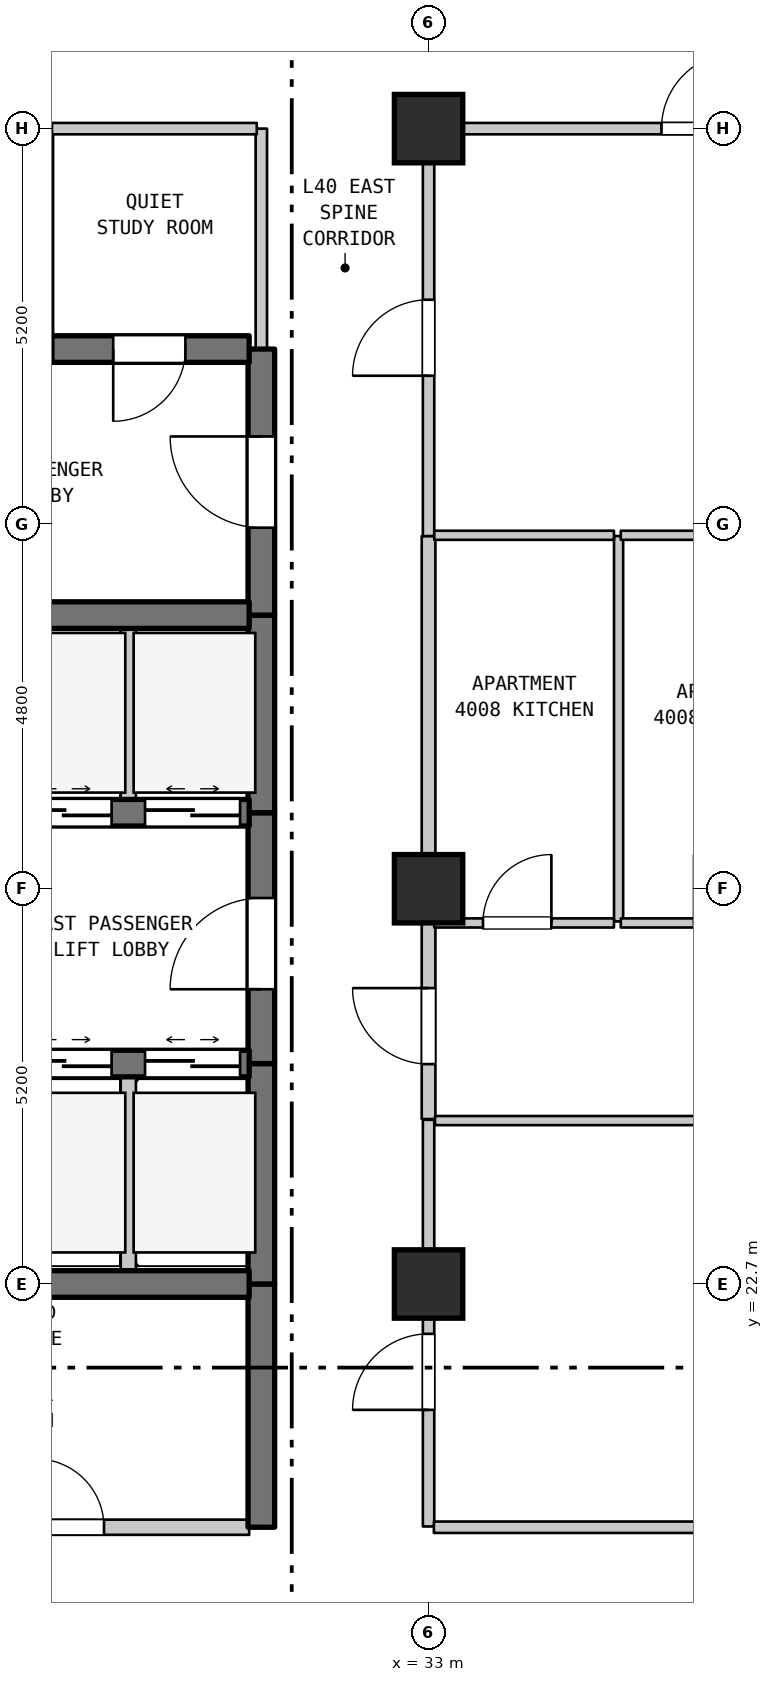
"""IFC4 building model, lengths in metres.
Left out: names, types, materials, properties, quantities, classifications, styles, units other than length and angle.
Written with IfcOpenShell. Run it as: python <this file> out.ifc"""

import sys

from ifc_helpers import new_model, si_unit, direction, frame, frame_2d, origin, origin_2d, place, context, subcontext, project, spatial, rectangle, extrude, element, fill, save


model = new_model("IFC4")
c1 = context("Model", 3, precision=1e-05, world=origin(), true_north=direction((0.0, 1.0)))
c2 = subcontext(c1, "Body", "Model", "MODEL_VIEW")
j1 = project(units=[si_unit("LENGTHUNIT", "METRE"), si_unit("PLANEANGLEUNIT", "RADIAN")], contexts=[c1])
p1 = place(None, origin())
s1 = spatial("IfcSite", under=j1, at=p1, CompositionType="ELEMENT")
p2 = place(p1, origin())
s2 = spatial("IfcBuilding", under=s1, at=p2, CompositionType="ELEMENT")
p3 = place(p2, frame((0.0, 0.0, 164.6)))
s3 = spatial("IfcBuildingStorey", under=s2, at=p3, CompositionType="ELEMENT", Elevation=164.6)
for number, where, z_axis, x_axis in (
    (1, (33.0, 22.7, 0.0), (0.0, 0.0, 1.0), (1.0, 0.0, 0.0)),
    (2, (33.0, 27.9, 0.0), (0.0, 0.0, 1.0), (1.0, 0.0, 0.0)),
    (3, (33.0, 37.9, 0.0), (0.0, 0.0, 1.0), (1.0, 0.0, 0.0)),
):
    element("IfcColumn", number, at=place(p3, frame(where, z_axis=z_axis, x_axis=x_axis)), inside=s3, PredefinedType="COLUMN", context=c2, shape_type="SweptSolid", body=[
        extrude(rectangle(XDim=0.9, YDim=0.9, at=origin_2d()), origin(), (0.0, 0.0, 1.0), 4.5),
    ])
p4 = place(p3, frame((28.0, 35.0, 0.0), z_axis=(0.0, 0.0, 1.0), x_axis=(0.0, 1.0, 0.0)))
e4 = element("IfcWall", 4, at=p4, inside=s3, PredefinedType="PARTITIONING", context=c2, shape_type="SweptSolid", body=[
    extrude(rectangle(XDim=2.9, YDim=0.12, at=frame_2d((1.45, 0.0))), origin(), (0.0, 0.0, 1.0), 4.19),
])
p5 = place(p3, frame((29.05, 22.7, 0.0), z_axis=(0.0, 0.0, 1.0), x_axis=(0.0, 1.0, 0.0)))
e5 = element("IfcWall", 5, at=p5, inside=s3, PredefinedType="STANDARD", context=c2, shape_type="SweptSolid", body=[
    extrude(rectangle(XDim=2.9, YDim=0.2, at=frame_2d((1.45, 0.0))), origin(), (0.0, 0.0, 1.0), 4.19),
])
p6 = place(p3, frame((29.05, 28.9, 0.0), z_axis=(0.0, 0.0, 1.0), x_axis=(0.0, 1.0, 0.0)))
e6 = element("IfcWall", 6, at=p6, inside=s3, PredefinedType="STANDARD", context=c2, shape_type="SweptSolid", body=[
    extrude(rectangle(XDim=2.6, YDim=0.2, at=frame_2d((1.3, 0.0))), origin(), (0.0, 0.0, 1.0), 4.19),
])
p7 = place(p3, frame((30.8, 19.5, 0.0), z_axis=(0.0, 0.0, 1.0), x_axis=(0.0, 1.0, 0.0)))
e7 = element("IfcWall", 7, at=p7, inside=s3, PredefinedType="SHEAR", context=c2, shape_type="SweptSolid", body=[
    extrude(rectangle(XDim=3.2, YDim=0.35, at=frame_2d((1.6, 0.0))), origin(), (0.0, 0.0, 1.0), 4.19),
])
p8 = place(p3, frame((30.8, 22.7, 0.0), z_axis=(0.0, 0.0, 1.0), x_axis=(0.0, 1.0, 0.0)))
e8 = element("IfcWall", 8, at=p8, inside=s3, PredefinedType="SHEAR", context=c2, shape_type="SweptSolid", body=[
    extrude(rectangle(XDim=2.9, YDim=0.35, at=frame_2d((1.45, 0.0))), origin(), (0.0, 0.0, 1.0), 4.19),
])
p9 = place(p3, frame((30.8, 25.6, 0.0), z_axis=(0.0, 0.0, 1.0), x_axis=(0.0, 1.0, 0.0)))
e9 = element("IfcWall", 9, at=p9, inside=s3, PredefinedType="SHEAR", context=c2, shape_type="SweptSolid", body=[
    extrude(rectangle(XDim=3.3, YDim=0.35, at=frame_2d((1.65, 0.0))), origin(), (0.0, 0.0, 1.0), 4.19),
])
p10 = place(p9, frame((0.978, 0.0, 0.0)))
e10 = element("IfcOpeningElement", 10, at=p10, cuts=e9, PredefinedType="OPENING", context=c2, shape_type="SweptSolid", body=[
    extrude(rectangle(XDim=1.2, YDim=2.2, at=frame_2d((0.6, 1.1))), frame((0.0, 0.185, 0.0), z_axis=(0.0, -1.0, 0.0), x_axis=(1.0, 0.0, 0.0)), (0.0, 0.0, 1.0), 0.37),
])
p11 = place(p3, frame((30.8, 28.9, 0.0), z_axis=(0.0, 0.0, 1.0), x_axis=(0.0, 1.0, 0.0)))
e11 = element("IfcWall", 11, at=p11, inside=s3, PredefinedType="SHEAR", context=c2, shape_type="SweptSolid", body=[
    extrude(rectangle(XDim=2.6, YDim=0.35, at=frame_2d((1.3, 0.0))), origin(), (0.0, 0.0, 1.0), 4.19),
])
p12 = place(p3, frame((30.8, 31.5, 0.0), z_axis=(0.0, 0.0, 1.0), x_axis=(0.0, 1.0, 0.0)))
e12 = element("IfcWall", 12, at=p12, inside=s3, PredefinedType="SHEAR", context=c2, shape_type="SweptSolid", body=[
    extrude(rectangle(XDim=3.5, YDim=0.35, at=frame_2d((1.75, 0.0))), origin(), (0.0, 0.0, 1.0), 4.19),
])
p13 = place(p12, frame((1.15, 0.0, 0.0)))
e13 = element("IfcOpeningElement", 13, at=p13, cuts=e12, PredefinedType="OPENING", context=c2, shape_type="SweptSolid", body=[
    extrude(rectangle(XDim=1.2, YDim=2.2, at=frame_2d((0.6, 1.1))), frame((0.0, 0.185, 0.0), z_axis=(0.0, -1.0, 0.0), x_axis=(1.0, 0.0, 0.0)), (0.0, 0.0, 1.0), 0.37),
])
p14 = place(p3, frame((30.8, 35.0, 0.0), z_axis=(0.0, 0.0, 1.0), x_axis=(0.0, 1.0, 0.0)))
e14 = element("IfcWall", 14, at=p14, inside=s3, PredefinedType="STANDARD", context=c2, shape_type="SweptSolid", body=[
    extrude(rectangle(XDim=2.9, YDim=0.15, at=frame_2d((1.45, 0.0))), origin(), (0.0, 0.0, 1.0), 4.19),
])
p15 = place(p3, frame((33.0, 19.51, 0.0), z_axis=(0.0, 0.0, 1.0), x_axis=(0.0, 1.0, 0.0)))
e15 = element("IfcWall", 15, at=p15, inside=s3, PredefinedType="STANDARD", context=c2, shape_type="SweptSolid", body=[
    extrude(rectangle(XDim=5.35, YDim=0.15, at=frame_2d((2.675, 0.0))), origin(), (0.0, 0.0, 1.0), 3.79),
])
p16 = place(p15, frame((1.534, 0.0, 0.0)))
e16 = element("IfcOpeningElement", 16, at=p16, cuts=e15, PredefinedType="OPENING", context=c2, shape_type="SweptSolid", body=[
    extrude(rectangle(XDim=1.0, YDim=2.15, at=frame_2d((0.5, 1.075))), frame((0.0, 0.085, 0.0), z_axis=(0.0, -1.0, 0.0), x_axis=(1.0, 0.0, 0.0)), (0.0, 0.0, 1.0), 0.17),
])
p17 = place(p3, frame((33.0, 24.87, 0.0), z_axis=(0.0, 0.0, 1.0), x_axis=(0.0, 1.0, 0.0)))
e17 = element("IfcWall", 17, at=p17, inside=s3, PredefinedType="STANDARD", context=c2, shape_type="SweptSolid", body=[
    extrude(rectangle(XDim=2.6, YDim=0.18, at=frame_2d((1.3, 0.0))), origin(), (0.0, 0.0, 1.0), 3.79),
])
p18 = place(p17, frame((0.723, 0.0, 0.0)))
e18 = element("IfcOpeningElement", 18, at=p18, cuts=e17, PredefinedType="OPENING", context=c2, shape_type="SweptSolid", body=[
    extrude(rectangle(XDim=1.0, YDim=2.15, at=frame_2d((0.5, 1.075))), frame((0.0, 0.1, 0.0), z_axis=(0.0, -1.0, 0.0), x_axis=(1.0, 0.0, 0.0)), (0.0, 0.0, 1.0), 0.2),
])
p19 = place(p3, frame((33.0, 27.47, 0.0), z_axis=(0.0, 0.0, 1.0), x_axis=(0.0, 1.0, 0.0)))
e19 = element("IfcWall", 19, at=p19, inside=s3, PredefinedType="STANDARD", context=c2, shape_type="SweptSolid", body=[
    extrude(rectangle(XDim=5.07, YDim=0.18, at=frame_2d((2.535, 0.0))), origin(), (0.0, 0.0, 1.0), 3.69),
])
p20 = place(p3, frame((33.0, 32.54, 0.0), z_axis=(0.0, 0.0, 1.0), x_axis=(0.0, 1.0, 0.0)))
e20 = element("IfcWall", 20, at=p20, inside=s3, PredefinedType="STANDARD", context=c2, shape_type="SweptSolid", body=[
    extrude(rectangle(XDim=5.36, YDim=0.15, at=frame_2d((2.68, 0.0))), origin(), (0.0, 0.0, 1.0), 3.69),
])
p21 = place(p20, frame((2.109, 0.0, 0.0)))
e21 = element("IfcOpeningElement", 21, at=p21, cuts=e20, PredefinedType="OPENING", context=c2, shape_type="SweptSolid", body=[
    extrude(rectangle(XDim=1.0, YDim=2.15, at=frame_2d((0.5, 1.075))), frame((0.0, 0.085, 0.0), z_axis=(0.0, -1.0, 0.0), x_axis=(1.0, 0.0, 0.0)), (0.0, 0.0, 1.0), 0.17),
])
p22 = place(p3, frame((35.5, 27.47, 0.0), z_axis=(0.0, 0.0, 1.0), x_axis=(0.0, 1.0, 0.0)))
e22 = element("IfcWall", 22, at=p22, inside=s3, PredefinedType="PARTITIONING", context=c2, shape_type="SweptSolid", body=[
    extrude(rectangle(XDim=5.07, YDim=0.12, at=frame_2d((2.535, 0.0))), origin(), (0.0, 0.0, 1.0), 4.19),
])
p23 = place(p3, frame((25.985, 19.5, 0.0), z_axis=(0.0, 0.0, 1.0), x_axis=(1.0, 0.0, 0.0)))
e23 = element("IfcWall", 23, at=p23, inside=s3, PredefinedType="STANDARD", context=c2, shape_type="SweptSolid", body=[
    extrude(rectangle(XDim=4.655, YDim=0.2, at=frame_2d((2.327, 0.0))), origin(), (0.0, 0.0, 1.0), 4.19),
])
p24 = place(p23, frame((1.845, 0.0, 0.0)))
e24 = element("IfcOpeningElement", 24, at=p24, cuts=e23, PredefinedType="OPENING", context=c2, shape_type="SweptSolid", body=[
    extrude(rectangle(XDim=0.9, YDim=2.15, at=frame_2d((0.45, 1.075))), frame((0.0, 0.11, 0.0), z_axis=(0.0, -1.0, 0.0), x_axis=(1.0, 0.0, 0.0)), (0.0, 0.0, 1.0), 0.22),
])
p25 = place(p3, frame((33.07, 19.5, 0.0), z_axis=(0.0, 0.0, 1.0), x_axis=(1.0, 0.0, 0.0)))
e25 = element("IfcWall", 25, at=p25, inside=s3, PredefinedType="STANDARD", context=c2, shape_type="SweptSolid", body=[
    extrude(rectangle(XDim=21.51, YDim=0.15, at=frame_2d((10.755, 0.0))), origin(), (0.0, 0.0, 1.0), 4.19),
])
p26 = place(p25, frame((10.185, 0.0, 0.0)))
e26 = element("IfcOpeningElement", 26, at=p26, cuts=e25, PredefinedType="OPENING", context=c2, shape_type="SweptSolid", body=[
    extrude(rectangle(XDim=1.0, YDim=2.15, at=frame_2d((0.5, 1.075))), frame((0.0, 0.085, 0.0), z_axis=(0.0, -1.0, 0.0), x_axis=(1.0, 0.0, 0.0)), (0.0, 0.0, 1.0), 0.17),
])
p27 = place(p3, frame((27.46, 22.7, 0.0), z_axis=(0.0, 0.0, 1.0), x_axis=(1.0, 0.0, 0.0)))
e27 = element("IfcWall", 27, at=p27, inside=s3, PredefinedType="SHEAR", context=c2, shape_type="SweptSolid", body=[
    extrude(rectangle(XDim=3.18, YDim=0.35, at=frame_2d((1.59, 0.0))), origin(), (0.0, 0.0, 1.0), 4.19),
])
p28 = place(p3, frame((33.085, 24.85, 0.0), z_axis=(0.0, 0.0, 1.0), x_axis=(1.0, 0.0, 0.0)))
e28 = element("IfcWall", 28, at=p28, inside=s3, PredefinedType="PARTITIONING", context=c2, shape_type="SweptSolid", body=[
    extrude(rectangle(XDim=23.905, YDim=0.12, at=frame_2d((11.953, 0.0))), origin(), (0.0, 0.0, 1.0), 4.19),
])
p29 = place(p3, frame((27.46, 25.6, 0.0), z_axis=(0.0, 0.0, 1.0), x_axis=(1.0, 0.0, 0.0)))
e29 = element("IfcWall", 29, at=p29, inside=s3, PredefinedType="SHEAR", context=c2, shape_type="SweptSolid", body=[
    extrude(rectangle(XDim=3.18, YDim=0.35, at=frame_2d((1.59, 0.0))), origin(), (0.0, 0.0, 1.0), 4.19),
])
p30 = place(p29, frame((0.12, 0.0, 0.0)))
e30 = element("IfcOpeningElement", 30, at=p30, cuts=e29, PredefinedType="OPENING", context=c2, shape_type="SweptSolid", body=[
    extrude(rectangle(XDim=1.25, YDim=2.2, at=frame_2d((0.625, 1.1))), frame((0.0, 0.185, 0.0), z_axis=(0.0, -1.0, 0.0), x_axis=(1.0, 0.0, 0.0)), (0.0, 0.0, 1.0), 0.37),
])
p31 = place(p29, frame((1.81, 0.0, 0.0)))
e31 = element("IfcOpeningElement", 31, at=p31, cuts=e29, PredefinedType="OPENING", context=c2, shape_type="SweptSolid", body=[
    extrude(rectangle(XDim=1.25, YDim=2.2, at=frame_2d((0.625, 1.1))), frame((0.0, 0.185, 0.0), z_axis=(0.0, -1.0, 0.0), x_axis=(1.0, 0.0, 0.0)), (0.0, 0.0, 1.0), 0.37),
])
p32 = place(p3, frame((33.075, 27.45, 0.0), z_axis=(0.0, 0.0, 1.0), x_axis=(1.0, 0.0, 0.0)))
e32 = element("IfcWall", 32, at=p32, inside=s3, PredefinedType="PARTITIONING", context=c2, shape_type="SweptSolid", body=[
    extrude(rectangle(XDim=2.364, YDim=0.12, at=frame_2d((1.182, 0.0))), origin(), (0.0, 0.0, 1.0), 4.19),
])
p33 = place(p32, frame((0.641, 0.0, 0.0)))
e33 = element("IfcOpeningElement", 33, at=p33, cuts=e32, PredefinedType="OPENING", context=c2, shape_type="SweptSolid", body=[
    extrude(rectangle(XDim=0.9, YDim=2.15, at=frame_2d((0.45, 1.075))), frame((0.0, 0.07, 0.0), z_axis=(0.0, -1.0, 0.0), x_axis=(1.0, 0.0, 0.0)), (0.0, 0.0, 1.0), 0.14),
])
p34 = place(p3, frame((35.529, 27.45, 0.0), z_axis=(0.0, 0.0, 1.0), x_axis=(1.0, 0.0, 0.0)))
e34 = element("IfcWall", 34, at=p34, inside=s3, PredefinedType="PARTITIONING", context=c2, shape_type="SweptSolid", body=[
    extrude(rectangle(XDim=2.826, YDim=0.12, at=frame_2d((1.413, 0.0))), origin(), (0.0, 0.0, 1.0), 4.19),
])
p35 = place(p34, frame((0.963, 0.0, 0.0)))
e35 = element("IfcOpeningElement", 35, at=p35, cuts=e34, PredefinedType="OPENING", context=c2, shape_type="SweptSolid", body=[
    extrude(rectangle(XDim=0.9, YDim=2.1, at=frame_2d((0.45, 1.05))), frame((0.0, 0.07, 0.0), z_axis=(0.0, -1.0, 0.0), x_axis=(1.0, 0.0, 0.0)), (0.0, 0.0, 1.0), 0.14),
])
p36 = place(p3, frame((27.46, 28.9, 0.0), z_axis=(0.0, 0.0, 1.0), x_axis=(1.0, 0.0, 0.0)))
e36 = element("IfcWall", 36, at=p36, inside=s3, PredefinedType="SHEAR", context=c2, shape_type="SweptSolid", body=[
    extrude(rectangle(XDim=3.18, YDim=0.35, at=frame_2d((1.59, 0.0))), origin(), (0.0, 0.0, 1.0), 4.19),
])
p37 = place(p36, frame((0.12, 0.0, 0.0)))
e37 = element("IfcOpeningElement", 37, at=p37, cuts=e36, PredefinedType="OPENING", context=c2, shape_type="SweptSolid", body=[
    extrude(rectangle(XDim=1.25, YDim=2.2, at=frame_2d((0.625, 1.1))), frame((0.0, 0.185, 0.0), z_axis=(0.0, -1.0, 0.0), x_axis=(1.0, 0.0, 0.0)), (0.0, 0.0, 1.0), 0.37),
])
p38 = place(p36, frame((1.81, 0.0, 0.0)))
e38 = element("IfcOpeningElement", 38, at=p38, cuts=e36, PredefinedType="OPENING", context=c2, shape_type="SweptSolid", body=[
    extrude(rectangle(XDim=1.25, YDim=2.2, at=frame_2d((0.625, 1.1))), frame((0.0, 0.185, 0.0), z_axis=(0.0, -1.0, 0.0), x_axis=(1.0, 0.0, 0.0)), (0.0, 0.0, 1.0), 0.37),
])
p39 = place(p3, frame((27.46, 31.5, 0.0), z_axis=(0.0, 0.0, 1.0), x_axis=(1.0, 0.0, 0.0)))
e39 = element("IfcWall", 39, at=p39, inside=s3, PredefinedType="SHEAR", context=c2, shape_type="SweptSolid", body=[
    extrude(rectangle(XDim=3.18, YDim=0.35, at=frame_2d((1.59, 0.0))), origin(), (0.0, 0.0, 1.0), 4.19),
])
p40 = place(p3, frame((33.075, 32.55, 0.0), z_axis=(0.0, 0.0, 1.0), x_axis=(1.0, 0.0, 0.0)))
e40 = element("IfcWall", 40, at=p40, inside=s3, PredefinedType="PARTITIONING", context=c2, shape_type="SweptSolid", body=[
    extrude(rectangle(XDim=2.364, YDim=0.12, at=frame_2d((1.182, 0.0))), origin(), (0.0, 0.0, 1.0), 4.19),
])
p41 = place(p3, frame((35.529, 32.55, 0.0), z_axis=(0.0, 0.0, 1.0), x_axis=(1.0, 0.0, 0.0)))
e41 = element("IfcWall", 41, at=p41, inside=s3, PredefinedType="PARTITIONING", context=c2, shape_type="SweptSolid", body=[
    extrude(rectangle(XDim=2.826, YDim=0.12, at=frame_2d((1.413, 0.0))), origin(), (0.0, 0.0, 1.0), 4.19),
])
p42 = place(p3, frame((28.045, 35.0, 0.0), z_axis=(0.0, 0.0, 1.0), x_axis=(1.0, 0.0, 0.0)))
e42 = element("IfcWall", 42, at=p42, inside=s3, PredefinedType="SHEAR", context=c2, shape_type="SweptSolid", body=[
    extrude(rectangle(XDim=2.595, YDim=0.35, at=frame_2d((1.297, 0.0))), origin(), (0.0, 0.0, 1.0), 4.19),
])
p43 = place(p42, frame((0.806, 0.0, 0.0)))
e43 = element("IfcOpeningElement", 43, at=p43, cuts=e42, PredefinedType="OPENING", context=c2, shape_type="SweptSolid", body=[
    extrude(rectangle(XDim=0.95, YDim=2.15, at=frame_2d((0.475, 1.075))), frame((0.0, 0.185, 0.0), z_axis=(0.0, -1.0, 0.0), x_axis=(1.0, 0.0, 0.0)), (0.0, 0.0, 1.0), 0.37),
])
p44 = place(p3, frame((28.045, 37.9, 0.0), z_axis=(0.0, 0.0, 1.0), x_axis=(1.0, 0.0, 0.0)))
e44 = element("IfcWall", 44, at=p44, inside=s3, PredefinedType="STANDARD", context=c2, shape_type="SweptSolid", body=[
    extrude(rectangle(XDim=2.695, YDim=0.15, at=frame_2d((1.348, 0.0))), origin(), (0.0, 0.0, 1.0), 3.69),
])
p45 = place(p3, frame((33.06, 37.9, 0.0), z_axis=(0.0, 0.0, 1.0), x_axis=(1.0, 0.0, 0.0)))
e45 = element("IfcWall", 45, at=p45, inside=s3, PredefinedType="STANDARD", context=c2, shape_type="SweptSolid", body=[
    extrude(rectangle(XDim=7.164, YDim=0.15, at=frame_2d((3.582, 0.0))), origin(), (0.0, 0.0, 1.0), 4.19),
])
p46 = place(p45, frame((3.004, 0.0, 0.0)))
e46 = element("IfcOpeningElement", 46, at=p46, cuts=e45, PredefinedType="OPENING", context=c2, shape_type="SweptSolid", body=[
    extrude(rectangle(XDim=1.0, YDim=2.15, at=frame_2d((0.5, 1.075))), frame((0.0, 0.085, 0.0), z_axis=(0.0, -1.0, 0.0), x_axis=(1.0, 0.0, 0.0)), (0.0, 0.0, 1.0), 0.17),
])
p47 = place(p10, origin())
e47 = element("IfcDoor", 47, at=p47, inside=s3, OperationType="SINGLE_SWING_LEFT", PredefinedType="DOOR", context=c2, shape_type="SweptSolid", body=[
    extrude(rectangle(XDim=1.2, YDim=2.2, at=frame_2d((0.6, 1.1))), frame((0.0, 0.025, 0.0), z_axis=(0.0, -1.0, 0.0), x_axis=(1.0, 0.0, 0.0)), (0.0, 0.0, 1.0), 0.05),
])
fill(e10, e47)
p48 = place(p13, origin())
e48 = element("IfcDoor", 48, at=p48, inside=s3, OperationType="SINGLE_SWING_RIGHT", PredefinedType="DOOR", context=c2, shape_type="SweptSolid", body=[
    extrude(rectangle(XDim=1.2, YDim=2.2, at=frame_2d((0.6, 1.1))), frame((0.0, 0.025, 0.0), z_axis=(0.0, -1.0, 0.0), x_axis=(1.0, 0.0, 0.0)), (0.0, 0.0, 1.0), 0.05),
])
fill(e13, e48)
p49 = place(p16, origin())
e49 = element("IfcDoor", 49, at=p49, inside=s3, OperationType="SINGLE_SWING_LEFT", PredefinedType="DOOR", context=c2, shape_type="SweptSolid", body=[
    extrude(rectangle(XDim=1.0, YDim=2.15, at=frame_2d((0.5, 1.075))), frame((0.0, 0.025, 0.0), z_axis=(0.0, -1.0, 0.0), x_axis=(1.0, 0.0, 0.0)), (0.0, 0.0, 1.0), 0.05),
])
fill(e16, e49)
p50 = place(p18, origin())
e50 = element("IfcDoor", 50, at=p50, inside=s3, OperationType="SINGLE_SWING_RIGHT", PredefinedType="DOOR", context=c2, shape_type="SweptSolid", body=[
    extrude(rectangle(XDim=1.0, YDim=2.15, at=frame_2d((0.5, 1.075))), frame((0.0, 0.025, 0.0), z_axis=(0.0, -1.0, 0.0), x_axis=(1.0, 0.0, 0.0)), (0.0, 0.0, 1.0), 0.05),
])
fill(e18, e50)
p51 = place(p21, origin())
e51 = element("IfcDoor", 51, at=p51, inside=s3, OperationType="SINGLE_SWING_LEFT", PredefinedType="DOOR", context=c2, shape_type="SweptSolid", body=[
    extrude(rectangle(XDim=1.0, YDim=2.15, at=frame_2d((0.5, 1.075))), frame((0.0, 0.025, 0.0), z_axis=(0.0, -1.0, 0.0), x_axis=(1.0, 0.0, 0.0)), (0.0, 0.0, 1.0), 0.05),
])
fill(e21, e51)
p52 = place(p24, origin())
e52 = element("IfcDoor", 52, at=p52, inside=s3, OperationType="SINGLE_SWING_LEFT", PredefinedType="DOOR", context=c2, shape_type="SweptSolid", body=[
    extrude(rectangle(XDim=0.9, YDim=2.15, at=frame_2d((0.45, 1.075))), frame((0.0, 0.025, 0.0), z_axis=(0.0, -1.0, 0.0), x_axis=(1.0, 0.0, 0.0)), (0.0, 0.0, 1.0), 0.05),
])
fill(e24, e52)
p53 = place(p30, origin())
e53 = element("IfcDoor", 53, at=p53, inside=s3, OperationType="DOUBLE_DOOR_SLIDING", PredefinedType="DOOR", context=c2, shape_type="SweptSolid", body=[
    extrude(rectangle(XDim=1.25, YDim=2.2, at=frame_2d((0.625, 1.1))), frame((0.0, 0.025, 0.0), z_axis=(0.0, -1.0, 0.0), x_axis=(1.0, 0.0, 0.0)), (0.0, 0.0, 1.0), 0.05),
])
fill(e30, e53)
p54 = place(p31, origin())
e54 = element("IfcDoor", 54, at=p54, inside=s3, OperationType="DOUBLE_DOOR_SLIDING", PredefinedType="DOOR", context=c2, shape_type="SweptSolid", body=[
    extrude(rectangle(XDim=1.25, YDim=2.2, at=frame_2d((0.625, 1.1))), frame((0.0, 0.025, 0.0), z_axis=(0.0, -1.0, 0.0), x_axis=(1.0, 0.0, 0.0)), (0.0, 0.0, 1.0), 0.05),
])
fill(e31, e54)
p55 = place(p33, origin())
e55 = element("IfcDoor", 55, at=p55, inside=s3, OperationType="SINGLE_SWING_RIGHT", PredefinedType="DOOR", context=c2, shape_type="SweptSolid", body=[
    extrude(rectangle(XDim=0.9, YDim=2.15, at=frame_2d((0.45, 1.075))), frame((0.0, 0.025, 0.0), z_axis=(0.0, -1.0, 0.0), x_axis=(1.0, 0.0, 0.0)), (0.0, 0.0, 1.0), 0.05),
])
fill(e33, e55)
p56 = place(p37, origin())
e56 = element("IfcDoor", 56, at=p56, inside=s3, OperationType="DOUBLE_DOOR_SLIDING", PredefinedType="DOOR", context=c2, shape_type="SweptSolid", body=[
    extrude(rectangle(XDim=1.25, YDim=2.2, at=frame_2d((0.625, 1.1))), frame((0.0, 0.025, 0.0), z_axis=(0.0, -1.0, 0.0), x_axis=(1.0, 0.0, 0.0)), (0.0, 0.0, 1.0), 0.05),
])
fill(e37, e56)
p57 = place(p38, origin())
e57 = element("IfcDoor", 57, at=p57, inside=s3, OperationType="DOUBLE_DOOR_SLIDING", PredefinedType="DOOR", context=c2, shape_type="SweptSolid", body=[
    extrude(rectangle(XDim=1.25, YDim=2.2, at=frame_2d((0.625, 1.1))), frame((0.0, 0.025, 0.0), z_axis=(0.0, -1.0, 0.0), x_axis=(1.0, 0.0, 0.0)), (0.0, 0.0, 1.0), 0.05),
])
fill(e38, e57)
p58 = place(p43, frame((0.95, 0.0, 0.0), z_axis=(0.0, 0.0, 1.0), x_axis=(-1.0, 0.0, 0.0)))
e58 = element("IfcDoor", 58, at=p58, inside=s3, OperationType="SINGLE_SWING_LEFT", PredefinedType="DOOR", context=c2, shape_type="SweptSolid", body=[
    extrude(rectangle(XDim=0.95, YDim=2.15, at=frame_2d((0.475, 1.075))), frame((0.0, 0.025, 0.0), z_axis=(0.0, -1.0, 0.0), x_axis=(1.0, 0.0, 0.0)), (0.0, 0.0, 1.0), 0.05),
])
fill(e43, e58)
p59 = place(p46, origin())
e59 = element("IfcDoor", 59, at=p59, inside=s3, OperationType="SINGLE_SWING_RIGHT", PredefinedType="DOOR", context=c2, shape_type="SweptSolid", body=[
    extrude(rectangle(XDim=1.0, YDim=2.15, at=frame_2d((0.5, 1.075))), frame((0.0, 0.025, 0.0), z_axis=(0.0, -1.0, 0.0), x_axis=(1.0, 0.0, 0.0)), (0.0, 0.0, 1.0), 0.05),
])
fill(e46, e59)
save(model, sys.argv[1])
